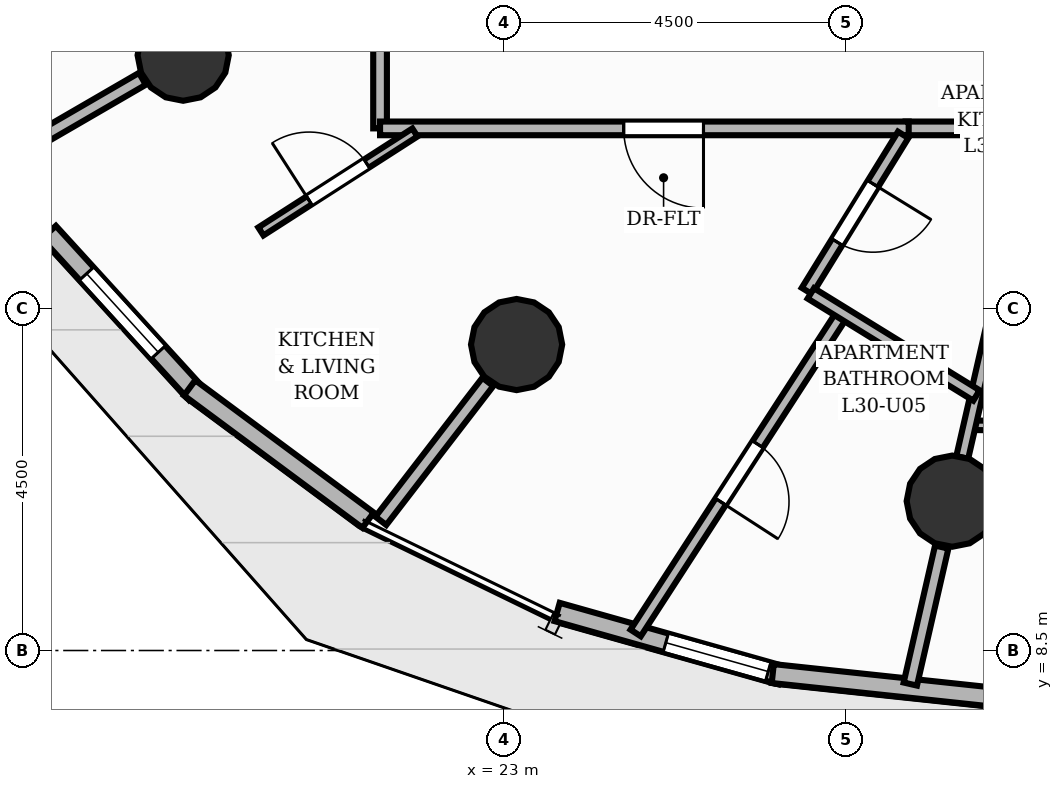
"""IFC4 building model, lengths in metres.
Left out: names, types, materials, properties, quantities, classifications, styles, units other than length and angle.
Written with IfcOpenShell. Run it as: python <this file> out.ifc"""

import sys

from ifc_helpers import new_model, si_unit, direction, frame, frame_2d, origin, origin_2d, place, context, subcontext, project, spatial, rectangle, circle, extrude, element, fill, save


model = new_model("IFC4")
c1 = context("Model", 3, precision=1e-05, world=origin(), true_north=direction((0.0, 1.0)))
c2 = subcontext(c1, "Body", "Model", "MODEL_VIEW")
j1 = project(units=[si_unit("LENGTHUNIT", "METRE"), si_unit("PLANEANGLEUNIT", "RADIAN")], contexts=[c1])
p1 = place(None, origin())
s1 = spatial("IfcSite", under=j1, at=p1, CompositionType="ELEMENT")
p2 = place(p1, origin())
s2 = spatial("IfcBuilding", under=s1, at=p2, CompositionType="ELEMENT")
p3 = place(p2, frame((0.0, 0.0, 102.88)))
s3 = spatial("IfcBuildingStorey", under=s2, at=p3, CompositionType="ELEMENT", Elevation=102.88)
for number, where, z_axis, x_axis in (
    (1, (18.78, 16.333, 0.0), (0.0, 0.0, 1.0), (1.0, 0.0, 0.0)),
    (2, (23.167, 12.526, 0.0), (0.0, 0.0, 1.0), (1.0, 0.0, 0.0)),
    (3, (28.898, 10.465, 0.0), (0.0, 0.0, 1.0), (1.0, 0.0, 0.0)),
):
    element("IfcColumn", number, at=place(p3, frame(where, z_axis=z_axis, x_axis=x_axis)), inside=s3, PredefinedType="COLUMN", context=c2, shape_type="SweptSolid", body=[
        extrude(circle(Radius=0.6, at=origin_2d()), origin(), (0.0, 0.0, 1.0), 3.2),
    ])
p4 = place(p3, frame((18.949, 11.879, 0.0), z_axis=(0.0, 0.0, 1.0), x_axis=(-0.673691100196, 0.739013059098, 0.0)))
e4 = element("IfcWall", 4, at=p4, inside=s3, PredefinedType="SOLIDWALL", context=c2, shape_type="SweptSolid", body=[
    extrude(rectangle(XDim=2.874, YDim=0.25, at=frame_2d((1.437, 0.0))), origin(), (0.0, 0.0, 1.0), 2.96),
])
p5 = place(p4, frame((0.737, 0.0, 0.85)))
e5 = element("IfcOpeningElement", 5, at=p5, cuts=e4, PredefinedType="OPENING", context=c2, shape_type="SweptSolid", body=[
    extrude(rectangle(XDim=1.4, YDim=1.55, at=frame_2d((0.7, 0.775))), frame((0.0, 0.135, 0.0), z_axis=(0.0, -1.0, 0.0), x_axis=(1.0, 0.0, 0.0)), (0.0, 0.0, 1.0), 0.27),
])
p6 = place(p3, frame((21.213, 10.215, 0.0), z_axis=(0.0, 0.0, 1.0), x_axis=(-0.803255279066, 0.595634918933, 0.0)))
e6 = element("IfcWall", 6, at=p6, inside=s3, PredefinedType="SOLIDWALL", context=c2, shape_type="SweptSolid", body=[
    extrude(rectangle(XDim=2.923, YDim=0.25, at=frame_2d((1.462, 0.0))), origin(), (0.0, 0.0, 1.0), 2.96),
])
p7 = place(p3, frame((26.646, 8.175, 0.0), z_axis=(0.0, 0.0, 1.0), x_axis=(-0.962391946781, 0.271664758059, 0.0)))
e7 = element("IfcWall", 7, at=p7, inside=s3, PredefinedType="SOLIDWALL", context=c2, shape_type="SweptSolid", body=[
    extrude(rectangle(XDim=3.061, YDim=0.25, at=frame_2d((1.531, 0.0))), origin(), (0.0, 0.0, 1.0), 2.96),
])
p8 = place(p7, frame((0.175, 0.0, 0.85)))
e8 = element("IfcOpeningElement", 8, at=p8, cuts=e7, PredefinedType="OPENING", context=c2, shape_type="SweptSolid", body=[
    extrude(rectangle(XDim=1.4, YDim=1.55, at=frame_2d((0.7, 0.775))), frame((0.0, 0.135, 0.0), z_axis=(0.0, -1.0, 0.0), x_axis=(1.0, 0.0, 0.0)), (0.0, 0.0, 1.0), 0.27),
])
p9 = place(p3, frame((29.65, 7.864, 0.0), z_axis=(0.0, 0.0, 1.0), x_axis=(-0.994353607356, 0.106117404502, 0.0)))
e9 = element("IfcWall", 9, at=p9, inside=s3, PredefinedType="SOLIDWALL", context=c2, shape_type="SweptSolid", body=[
    extrude(rectangle(XDim=3.131, YDim=0.25, at=frame_2d((1.565, 0.0))), origin(), (0.0, 0.0, 1.0), 2.96),
])
p10 = place(p3, frame((18.243, 16.022, 0.0), z_axis=(0.0, 0.0, 1.0), x_axis=(-0.865046864493, -0.501691062539, 0.0)))
e10 = element("IfcWall", 10, at=p10, inside=s3, PredefinedType="PARTITIONING", context=c2, shape_type="SweptSolid", body=[
    extrude(rectangle(XDim=2.028, YDim=0.18, at=frame_2d((1.014, 0.0))), origin(), (0.0, 0.0, 1.0), 2.261),
])
p11 = place(p3, frame((22.788, 12.034, 0.0), z_axis=(0.0, 0.0, 1.0), x_axis=(-0.610007255548, -0.792395827967, 0.0)))
e11 = element("IfcWall", 11, at=p11, inside=s3, PredefinedType="PARTITIONING", context=c2, shape_type="SweptSolid", body=[
    extrude(rectangle(XDim=2.308, YDim=0.18, at=frame_2d((1.154, 0.0))), origin(), (0.0, 0.0, 1.0), 2.261),
])
p12 = place(p3, frame((28.76, 9.861, 0.0), z_axis=(0.0, 0.0, 1.0), x_axis=(-0.2234127464, -0.974723932581, 0.0)))
e12 = element("IfcWall", 12, at=p12, inside=s3, PredefinedType="PARTITIONING", context=c2, shape_type="SweptSolid", body=[
    extrude(rectangle(XDim=1.849, YDim=0.18, at=frame_2d((0.924, 0.0))), origin(), (0.0, 0.0, 1.0), 2.261),
])
p13 = place(p3, frame((42.63, 15.37, 0.0), z_axis=(0.0, 0.0, 1.0), x_axis=(-1.0, 0.0, 0.0)))
e13 = element("IfcWall", 13, at=p13, inside=s3, PredefinedType="PARTITIONING", context=c2, shape_type="SweptSolid", body=[
    extrude(rectangle(XDim=14.346, YDim=0.18, at=frame_2d((7.173, 0.0))), origin(), (0.0, 0.0, 1.0), 2.955),
])
p14 = place(p13, frame((6.615, 0.0, 0.0)))
e14 = element("IfcOpeningElement", 14, at=p14, cuts=e13, PredefinedType="OPENING", context=c2, shape_type="SweptSolid", body=[
    extrude(rectangle(XDim=1.05, YDim=2.15, at=frame_2d((0.525, 1.075))), frame((0.0, 0.1, 0.0), z_axis=(0.0, -1.0, 0.0), x_axis=(1.0, 0.0, 0.0)), (0.0, 0.0, 1.0), 0.2),
])
p15 = place(p3, frame((21.37, 15.37, 0.0), z_axis=(0.0, 0.0, 1.0), x_axis=(0.0, 1.0, 0.0)))
e15 = element("IfcWall", 15, at=p15, inside=s3, PredefinedType="PARTITIONING", context=c2, shape_type="SweptSolid", body=[
    extrude(rectangle(XDim=17.26, YDim=0.18, at=frame_2d((8.63, 0.0))), origin(), (0.0, 0.0, 1.0), 2.955),
])
p16 = place(p15, frame((13.794, 0.0, 0.0)))
e16 = element("IfcOpeningElement", 16, at=p16, cuts=e15, PredefinedType="OPENING", context=c2, shape_type="SweptSolid", body=[
    extrude(rectangle(XDim=1.05, YDim=2.15, at=frame_2d((0.525, 1.075))), frame((0.0, 0.1, 0.0), z_axis=(0.0, -1.0, 0.0), x_axis=(1.0, 0.0, 0.0)), (0.0, 0.0, 1.0), 0.2),
])
p17 = place(p3, frame((28.325, 15.37, 0.0), z_axis=(0.0, 0.0, 1.0), x_axis=(-1.0, 0.0, 0.0)))
e17 = element("IfcWall", 17, at=p17, inside=s3, PredefinedType="PARTITIONING", context=c2, shape_type="SweptSolid", body=[
    extrude(rectangle(XDim=6.955, YDim=0.18, at=frame_2d((3.478, 0.0))), origin(), (0.0, 0.0, 1.0), 2.955),
])
p18 = place(p17, frame((2.7, 0.0, 0.0)))
e18 = element("IfcOpeningElement", 18, at=p18, cuts=e17, PredefinedType="OPENING", context=c2, shape_type="SweptSolid", body=[
    extrude(rectangle(XDim=1.05, YDim=2.15, at=frame_2d((0.525, 1.075))), frame((0.0, 0.1, 0.0), z_axis=(0.0, -1.0, 0.0), x_axis=(1.0, 0.0, 0.0)), (0.0, 0.0, 1.0), 0.2),
])
p19 = place(p3, frame((34.368, 11.384, 0.0), z_axis=(0.0, 0.0, 1.0), x_axis=(-0.999882579861, 0.015324049414, 0.0)))
e19 = element("IfcWall", 19, at=p19, inside=s3, PredefinedType="PARTITIONING", context=c2, shape_type="SweptSolid", body=[
    extrude(rectangle(XDim=5.242, YDim=0.125, at=frame_2d((2.621, 0.0))), origin(), (0.0, 0.0, 1.0), 2.955),
])
p20 = place(p19, frame((2.171, 0.0, 0.0)))
e20 = element("IfcOpeningElement", 20, at=p20, cuts=e19, PredefinedType="OPENING", context=c2, shape_type="SweptSolid", body=[
    extrude(rectangle(XDim=0.9, YDim=2.1, at=frame_2d((0.45, 1.05))), frame((0.0, 0.073, 0.0), z_axis=(0.0, -1.0, 0.0), x_axis=(1.0, 0.0, 0.0)), (0.0, 0.0, 1.0), 0.145),
])
p21 = place(p3, frame((29.03, 11.041, 0.0), z_axis=(0.0, 0.0, 1.0), x_axis=(0.223478419757, 0.974708877513, 0.0)))
e21 = element("IfcWall", 21, at=p21, inside=s3, PredefinedType="PLUMBINGWALL", context=c2, shape_type="SweptSolid", body=[
    extrude(rectangle(XDim=4.442, YDim=0.16, at=frame_2d((2.221, 0.0))), origin(), (0.0, 0.0, 1.0), 2.261),
])
p22 = place(p3, frame((27.458, 12.94, 0.0), z_axis=(0.0, 0.0, 1.0), x_axis=(-0.543424886613, -0.839457796801, 0.0)))
e22 = element("IfcWall", 22, at=p22, inside=s3, PredefinedType="PLUMBINGWALL", context=c2, shape_type="SweptSolid", body=[
    extrude(rectangle(XDim=5.014, YDim=0.16, at=frame_2d((2.507, 0.0))), origin(), (0.0, 0.0, 1.0), 2.642),
])
p23 = place(p22, frame((2.057, 0.0, 0.0)))
e23 = element("IfcOpeningElement", 23, at=p23, cuts=e22, PredefinedType="OPENING", context=c2, shape_type="SweptSolid", body=[
    extrude(rectangle(XDim=0.9, YDim=2.1, at=frame_2d((0.45, 1.05))), frame((0.0, 0.09, 0.0), z_axis=(0.0, -1.0, 0.0), x_axis=(1.0, 0.0, 0.0)), (0.0, 0.0, 1.0), 0.18),
])
p24 = place(p3, frame((19.802, 14.014, 0.0), z_axis=(0.0, 0.0, 1.0), x_axis=(0.841349696578, 0.540491154477, 0.0)))
e24 = element("IfcWall", 24, at=p24, inside=s3, PredefinedType="PARTITIONING", context=c2, shape_type="SweptSolid", body=[
    extrude(rectangle(XDim=2.408, YDim=0.125, at=frame_2d((1.204, 0.0))), origin(), (0.0, 0.0, 1.0), 2.955),
])
p25 = place(p24, frame((0.754, 0.0, 0.0)))
e25 = element("IfcOpeningElement", 25, at=p25, cuts=e24, PredefinedType="OPENING", context=c2, shape_type="SweptSolid", body=[
    extrude(rectangle(XDim=0.9, YDim=2.1, at=frame_2d((0.45, 1.05))), frame((0.0, 0.073, 0.0), z_axis=(0.0, -1.0, 0.0), x_axis=(1.0, 0.0, 0.0)), (0.0, 0.0, 1.0), 0.145),
])
p26 = place(p3, frame((28.253, 15.285, 0.0), z_axis=(0.0, 0.0, 1.0), x_axis=(-0.524605293124, -0.851345574033, 0.0)))
e26 = element("IfcWall", 26, at=p26, inside=s3, PredefinedType="PLUMBINGWALL", context=c2, shape_type="SweptSolid", body=[
    extrude(rectangle(XDim=2.414, YDim=0.16, at=frame_2d((1.207, 0.0))), origin(), (0.0, 0.0, 1.0), 2.955),
])
p27 = place(p26, frame((0.757, 0.0, 0.0)))
e27 = element("IfcOpeningElement", 27, at=p27, cuts=e26, PredefinedType="OPENING", context=c2, shape_type="SweptSolid", body=[
    extrude(rectangle(XDim=0.9, YDim=2.1, at=frame_2d((0.45, 1.05))), frame((0.0, 0.09, 0.0), z_axis=(0.0, -1.0, 0.0), x_axis=(1.0, 0.0, 0.0)), (0.0, 0.0, 1.0), 0.18),
])
p28 = place(p3, frame((27.038, 13.199, 0.0), z_axis=(0.0, 0.0, 1.0), x_axis=(0.851314293413, -0.524656052887, 0.0)))
e28 = element("IfcWall", 28, at=p28, inside=s3, PredefinedType="PLUMBINGWALL", context=c2, shape_type="SweptSolid", body=[
    extrude(rectangle(XDim=2.56, YDim=0.16, at=frame_2d((1.28, 0.0))), origin(), (0.0, 0.0, 1.0), 2.955),
])
p29 = place(p5, origin())
e29 = element("IfcWindow", 29, at=p29, inside=s3, PartitioningType="SINGLE_PANEL", PredefinedType="WINDOW", context=c2, shape_type="SweptSolid", body=[
    extrude(rectangle(XDim=1.4, YDim=1.55, at=frame_2d((0.7, 0.775))), frame((0.0, 0.03, 0.0), z_axis=(0.0, -1.0, 0.0), x_axis=(1.0, 0.0, 0.0)), (0.0, 0.0, 1.0), 0.06),
])
fill(e5, e29)
p30 = place(p8, origin())
e30 = element("IfcWindow", 30, at=p30, inside=s3, PartitioningType="SINGLE_PANEL", PredefinedType="WINDOW", context=c2, shape_type="SweptSolid", body=[
    extrude(rectangle(XDim=1.4, YDim=1.55, at=frame_2d((0.7, 0.775))), frame((0.0, 0.03, 0.0), z_axis=(0.0, -1.0, 0.0), x_axis=(1.0, 0.0, 0.0)), (0.0, 0.0, 1.0), 0.06),
])
fill(e8, e30)
p31 = place(p18, origin())
e31 = element("IfcDoor", 31, at=p31, inside=s3, OperationType="SINGLE_SWING_LEFT", PredefinedType="DOOR", context=c2, shape_type="SweptSolid", body=[
    extrude(rectangle(XDim=1.05, YDim=2.15, at=frame_2d((0.525, 1.075))), frame((0.0, 0.025, 0.0), z_axis=(0.0, -1.0, 0.0), x_axis=(1.0, 0.0, 0.0)), (0.0, 0.0, 1.0), 0.05),
])
fill(e18, e31)
p32 = place(p23, origin())
e32 = element("IfcDoor", 32, at=p32, inside=s3, OperationType="SINGLE_SWING_RIGHT", PredefinedType="DOOR", context=c2, shape_type="SweptSolid", body=[
    extrude(rectangle(XDim=0.9, YDim=2.1, at=frame_2d((0.45, 1.05))), frame((0.0, 0.025, 0.0), z_axis=(0.0, -1.0, 0.0), x_axis=(1.0, 0.0, 0.0)), (0.0, 0.0, 1.0), 0.05),
])
fill(e23, e32)
p33 = place(p25, origin())
e33 = element("IfcDoor", 33, at=p33, inside=s3, OperationType="SINGLE_SWING_LEFT", PredefinedType="DOOR", context=c2, shape_type="SweptSolid", body=[
    extrude(rectangle(XDim=0.9, YDim=2.1, at=frame_2d((0.45, 1.05))), frame((0.0, 0.025, 0.0), z_axis=(0.0, -1.0, 0.0), x_axis=(1.0, 0.0, 0.0)), (0.0, 0.0, 1.0), 0.05),
])
fill(e25, e33)
p34 = place(p27, origin())
e34 = element("IfcDoor", 34, at=p34, inside=s3, OperationType="SINGLE_SWING_LEFT", PredefinedType="DOOR", context=c2, shape_type="SweptSolid", body=[
    extrude(rectangle(XDim=0.9, YDim=2.1, at=frame_2d((0.45, 1.05))), frame((0.0, 0.025, 0.0), z_axis=(0.0, -1.0, 0.0), x_axis=(1.0, 0.0, 0.0)), (0.0, 0.0, 1.0), 0.05),
])
fill(e27, e34)
save(model, sys.argv[1])
